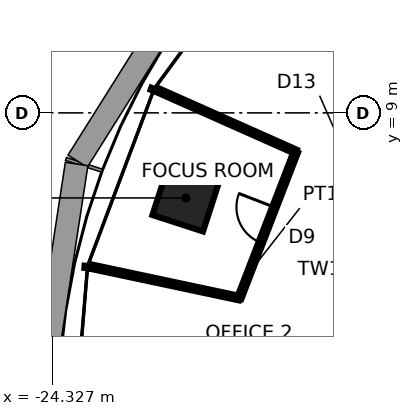
"""IFC4 building model, lengths in metres.
Left out: names, types, materials, properties, quantities, classifications, styles, units other than length and angle.
Written with IfcOpenShell. Run it as: python <this file> out.ifc"""

import sys

from ifc_helpers import new_model, si_unit, direction, frame, frame_2d, origin, origin_2d, place, context, subcontext, project, spatial, rectangle, extrude, element, fill, save


model = new_model("IFC4")
c1 = context("Model", 3, precision=1e-05, world=origin(), true_north=direction((0.0, 1.0)))
c2 = subcontext(c1, "Body", "Model", "MODEL_VIEW")
j1 = project(units=[si_unit("LENGTHUNIT", "METRE"), si_unit("PLANEANGLEUNIT", "RADIAN")], contexts=[c1])
p1 = place(None, origin())
s1 = spatial("IfcSite", under=j1, at=p1, CompositionType="ELEMENT")
p2 = place(p1, origin())
s2 = spatial("IfcBuilding", under=s1, at=p2, CompositionType="ELEMENT")
p3 = place(p2, frame((0.0, 0.0, 195.5)))
s3 = spatial("IfcBuildingStorey", under=s2, at=p3, CompositionType="ELEMENT", Elevation=195.5)
p4 = place(p3, frame((-20.808, 6.761, 0.0), z_axis=(0.0, 0.0, 1.0), x_axis=(-0.951056516295, 0.309016994375, 0.0)))
e1 = element("IfcColumn", 1, at=p4, inside=s3, PredefinedType="COLUMN", context=c2, shape_type="SweptSolid", body=[
    extrude(rectangle(XDim=1.4, YDim=1.4, at=origin_2d()), origin(), (0.0, 0.0, 1.0), 3.9),
])
p5 = place(p3, frame((-17.915, 7.976, 0.0), z_axis=(0.0, 0.0, 1.0), x_axis=(-0.913549606868, 0.406727323635, 0.0)))
e2 = element("IfcWall", 2, at=p5, inside=s3, PredefinedType="PARTITIONING", context=c2, shape_type="SweptSolid", body=[
    extrude(rectangle(XDim=4.0, YDim=0.12, at=frame_2d((2.0, 0.0))), origin(), (0.0, 0.0, 1.0), 3.74),
])
p6 = place(p3, frame((-19.405, 4.125, 0.0), z_axis=(0.0, 0.0, 1.0), x_axis=(0.360725417702, 0.932672060814, 0.0)))
e3 = element("IfcWall", 3, at=p6, inside=s3, PredefinedType="PARTITIONING", context=c2, shape_type="SweptSolid", body=[
    extrude(rectangle(XDim=4.13, YDim=0.12, at=frame_2d((2.065, 0.0))), origin(), (0.0, 0.0, 1.0), 3.334),
])
p7 = place(p6, frame((1.565, 0.0, 0.0)))
e4 = element("IfcOpeningElement", 4, at=p7, cuts=e3, PredefinedType="OPENING", context=c2, shape_type="SweptSolid", body=[
    extrude(rectangle(XDim=1.0, YDim=2.4, at=frame_2d((0.5, 1.2))), frame((0.0, 0.07, 0.0), z_axis=(0.0, -1.0, 0.0), x_axis=(1.0, 0.0, 0.0)), (0.0, 0.0, 1.0), 0.14),
])
p8 = place(p3, frame((-23.317, 4.956, 0.0), z_axis=(0.0, 0.0, 1.0), x_axis=(0.978140543132, -0.207944891454, 0.0)))
e5 = element("IfcWall", 5, at=p8, inside=s3, PredefinedType="PARTITIONING", context=c2, shape_type="SweptSolid", body=[
    extrude(rectangle(XDim=4.0, YDim=0.12, at=frame_2d((2.0, 0.0))), origin(), (0.0, 0.0, 1.0), 3.74),
])
p9 = place(p7, origin())
e6 = element("IfcDoor", 6, at=p9, inside=s3, OperationType="SINGLE_SWING_RIGHT", PredefinedType="DOOR", context=c2, shape_type="SweptSolid", body=[
    extrude(rectangle(XDim=1.0, YDim=2.4, at=frame_2d((0.5, 1.2))), frame((0.0, 0.025, 0.0), z_axis=(0.0, -1.0, 0.0), x_axis=(1.0, 0.0, 0.0)), (0.0, 0.0, 1.0), 0.05),
])
fill(e4, e6)
save(model, sys.argv[1])
